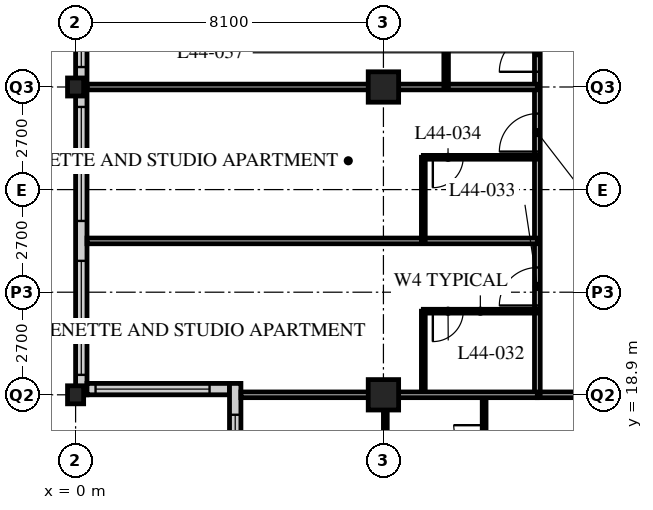
"""IFC4 building model, lengths in metres.
Left out: names, types, materials, properties, quantities, classifications, styles, units other than length and angle.
Written with IfcOpenShell. Run it as: python <this file> out.ifc"""

import sys

from ifc_helpers import new_model, si_unit, direction, frame, frame_2d, origin, origin_2d, place, context, subcontext, project, spatial, rectangle, hollow_rectangle, i_section, extrude, element, fill, save


model = new_model("IFC4")
c1 = context("Model", 3, precision=1e-05, world=origin(), true_north=direction((0.0, 1.0)))
c2 = subcontext(c1, "Body", "Model", "MODEL_VIEW")
j1 = project(units=[si_unit("LENGTHUNIT", "METRE"), si_unit("PLANEANGLEUNIT", "RADIAN")], contexts=[c1])
p1 = place(None, origin())
s1 = spatial("IfcSite", under=j1, at=p1, CompositionType="ELEMENT")
p2 = place(p1, origin())
s2 = spatial("IfcBuilding", under=s1, at=p2, CompositionType="ELEMENT")
p3 = place(p2, frame((0.0, 0.0, 174.0)))
s3 = spatial("IfcBuildingStorey", under=s2, at=p3, CompositionType="ELEMENT", Elevation=174.0)
for number, where, z_axis, x_axis in (
    (1, (0.0, 18.9, 0.0), (0.0, 0.0, 1.0), (1.0, 0.0, 0.0)),
    (2, (0.0, 27.0, 0.0), (0.0, 0.0, 1.0), (1.0, 0.0, 0.0)),
):
    element("IfcColumn", number, at=place(p3, frame(where, z_axis=z_axis, x_axis=x_axis)), inside=s3, PredefinedType="COLUMN", context=c2, shape_type="SweptSolid", body=[
        extrude(i_section(OverallWidth=0.424, OverallDepth=0.475, WebThickness=0.048, FlangeThickness=0.077, FilletRadius=0.015, at=origin_2d()), origin(), (0.0, 0.0, 1.0), 3.6),
    ])
for number, where, z_axis, x_axis in (
    (3, (8.1, 18.9, 0.0), (0.0, 0.0, 1.0), (1.0, 0.0, 0.0)),
    (4, (8.1, 27.0, 0.0), (0.0, 0.0, 1.0), (1.0, 0.0, 0.0)),
):
    element("IfcColumn", number, at=place(p3, frame(where, z_axis=z_axis, x_axis=x_axis)), inside=s3, PredefinedType="COLUMN", context=c2, shape_type="SweptSolid", body=[
        extrude(hollow_rectangle(XDim=0.8, YDim=0.8, WallThickness=0.08, at=origin_2d()), origin(), (0.0, 0.0, 1.0), 3.6),
    ])
p4 = place(p3, frame((0.15, 51.0, 0.0), z_axis=(0.0, 0.0, 1.0), x_axis=(0.0, -1.0, 0.0)))
e5 = element("IfcWall", 5, at=p4, inside=s3, PredefinedType="SOLIDWALL", context=c2, shape_type="SweptSolid", body=[
    extrude(rectangle(XDim=32.1, YDim=0.3, at=frame_2d((16.05, 0.0))), origin(), (0.0, 0.0, 1.0), 3.39),
])
p5 = place(p4, frame((0.225, 0.0, 0.6)))
e6 = element("IfcOpeningElement", 6, at=p5, cuts=e5, PredefinedType="OPENING", context=c2, shape_type="SweptSolid", body=[
    extrude(rectangle(XDim=3.0, YDim=2.4, at=frame_2d((1.5, 1.2))), frame((0.0, 0.16, 0.0), z_axis=(0.0, -1.0, 0.0), x_axis=(1.0, 0.0, 0.0)), (0.0, 0.0, 1.0), 0.32),
])
p6 = place(p4, frame((4.275, 0.0, 0.6)))
e7 = element("IfcOpeningElement", 7, at=p6, cuts=e5, PredefinedType="OPENING", context=c2, shape_type="SweptSolid", body=[
    extrude(rectangle(XDim=3.0, YDim=2.4, at=frame_2d((1.5, 1.2))), frame((0.0, 0.16, 0.0), z_axis=(0.0, -1.0, 0.0), x_axis=(1.0, 0.0, 0.0)), (0.0, 0.0, 1.0), 0.32),
])
p7 = place(p4, frame((8.325, 0.0, 0.6)))
e8 = element("IfcOpeningElement", 8, at=p7, cuts=e5, PredefinedType="OPENING", context=c2, shape_type="SweptSolid", body=[
    extrude(rectangle(XDim=3.0, YDim=2.4, at=frame_2d((1.5, 1.2))), frame((0.0, 0.16, 0.0), z_axis=(0.0, -1.0, 0.0), x_axis=(1.0, 0.0, 0.0)), (0.0, 0.0, 1.0), 0.32),
])
p8 = place(p4, frame((12.375, 0.0, 0.6)))
e9 = element("IfcOpeningElement", 9, at=p8, cuts=e5, PredefinedType="OPENING", context=c2, shape_type="SweptSolid", body=[
    extrude(rectangle(XDim=3.0, YDim=2.4, at=frame_2d((1.5, 1.2))), frame((0.0, 0.16, 0.0), z_axis=(0.0, -1.0, 0.0), x_axis=(1.0, 0.0, 0.0)), (0.0, 0.0, 1.0), 0.32),
])
p9 = place(p4, frame((16.425, 0.0, 0.6)))
e10 = element("IfcOpeningElement", 10, at=p9, cuts=e5, PredefinedType="OPENING", context=c2, shape_type="SweptSolid", body=[
    extrude(rectangle(XDim=3.0, YDim=2.4, at=frame_2d((1.5, 1.2))), frame((0.0, 0.16, 0.0), z_axis=(0.0, -1.0, 0.0), x_axis=(1.0, 0.0, 0.0)), (0.0, 0.0, 1.0), 0.32),
])
p10 = place(p4, frame((20.475, 0.0, 0.6)))
e11 = element("IfcOpeningElement", 11, at=p10, cuts=e5, PredefinedType="OPENING", context=c2, shape_type="SweptSolid", body=[
    extrude(rectangle(XDim=3.0, YDim=2.4, at=frame_2d((1.5, 1.2))), frame((0.0, 0.16, 0.0), z_axis=(0.0, -1.0, 0.0), x_axis=(1.0, 0.0, 0.0)), (0.0, 0.0, 1.0), 0.32),
])
p11 = place(p4, frame((24.525, 0.0, 0.6)))
e12 = element("IfcOpeningElement", 12, at=p11, cuts=e5, PredefinedType="OPENING", context=c2, shape_type="SweptSolid", body=[
    extrude(rectangle(XDim=3.0, YDim=2.4, at=frame_2d((1.5, 1.2))), frame((0.0, 0.16, 0.0), z_axis=(0.0, -1.0, 0.0), x_axis=(1.0, 0.0, 0.0)), (0.0, 0.0, 1.0), 0.32),
])
p12 = place(p4, frame((28.575, 0.0, 0.6)))
e13 = element("IfcOpeningElement", 13, at=p12, cuts=e5, PredefinedType="OPENING", context=c2, shape_type="SweptSolid", body=[
    extrude(rectangle(XDim=3.0, YDim=2.4, at=frame_2d((1.5, 1.2))), frame((0.0, 0.16, 0.0), z_axis=(0.0, -1.0, 0.0), x_axis=(1.0, 0.0, 0.0)), (0.0, 0.0, 1.0), 0.32),
])
p13 = place(p3, frame((0.3, 19.05, 0.0), z_axis=(0.0, 0.0, 1.0), x_axis=(1.0, 0.0, 0.0)))
e14 = element("IfcWall", 14, at=p13, inside=s3, PredefinedType="SOLIDWALL", context=c2, shape_type="SweptSolid", body=[
    extrude(rectangle(XDim=3.75, YDim=0.3, at=frame_2d((1.875, 0.0))), origin(), (0.0, 0.0, 1.0), 3.39),
])
p14 = place(p13, frame((0.225, 0.0, 0.6)))
e15 = element("IfcOpeningElement", 15, at=p14, cuts=e14, PredefinedType="OPENING", context=c2, shape_type="SweptSolid", body=[
    extrude(rectangle(XDim=3.0, YDim=2.0, at=frame_2d((1.5, 1.0))), frame((0.0, 0.16, 0.0), z_axis=(0.0, -1.0, 0.0), x_axis=(1.0, 0.0, 0.0)), (0.0, 0.0, 1.0), 0.32),
])
p15 = place(p3, frame((4.2, 19.2, 0.0), z_axis=(0.0, 0.0, 1.0), x_axis=(0.0, -1.0, 0.0)))
e16 = element("IfcWall", 16, at=p15, inside=s3, PredefinedType="SOLIDWALL", context=c2, shape_type="SweptSolid", body=[
    extrude(rectangle(XDim=4.35, YDim=0.3, at=frame_2d((2.175, 0.0))), origin(), (0.0, 0.0, 1.0), 3.39),
])
p16 = place(p15, frame((0.825, 0.0, 0.6)))
e17 = element("IfcOpeningElement", 17, at=p16, cuts=e16, PredefinedType="OPENING", context=c2, shape_type="SweptSolid", body=[
    extrude(rectangle(XDim=3.0, YDim=2.0, at=frame_2d((1.5, 1.0))), frame((0.0, 0.16, 0.0), z_axis=(0.0, -1.0, 0.0), x_axis=(1.0, 0.0, 0.0)), (0.0, 0.0, 1.0), 0.32),
])
p17 = place(p3, frame((12.15, 18.9, 0.0), z_axis=(0.0, 0.0, 1.0), x_axis=(1.0, 0.0, 0.0)))
e18 = element("IfcWall", 18, at=p17, inside=s3, PredefinedType="PARTITIONING", context=c2, shape_type="SweptSolid", body=[
    extrude(rectangle(XDim=32.4, YDim=0.15, at=frame_2d((16.2, 0.0))), origin(), (0.0, 0.0, 1.0), 2.778),
])
p18 = place(p17, frame((6.4, 0.0, 0.0)))
e19 = element("IfcOpeningElement", 19, at=p18, cuts=e18, PredefinedType="OPENING", context=c2, shape_type="SweptSolid", body=[
    extrude(rectangle(XDim=1.0, YDim=2.1, at=frame_2d((0.5, 1.05))), frame((0.0, 0.085, 0.0), z_axis=(0.0, -1.0, 0.0), x_axis=(1.0, 0.0, 0.0)), (0.0, 0.0, 1.0), 0.17),
])
p19 = place(p17, frame((8.8, 0.0, 0.0)))
e20 = element("IfcOpeningElement", 20, at=p19, cuts=e18, PredefinedType="OPENING", context=c2, shape_type="SweptSolid", body=[
    extrude(rectangle(XDim=1.0, YDim=2.1, at=frame_2d((0.5, 1.05))), frame((0.0, 0.085, 0.0), z_axis=(0.0, -1.0, 0.0), x_axis=(1.0, 0.0, 0.0)), (0.0, 0.0, 1.0), 0.17),
])
p20 = place(p17, frame((13.05, 0.0, 0.0)))
e21 = element("IfcOpeningElement", 21, at=p20, cuts=e18, PredefinedType="OPENING", context=c2, shape_type="SweptSolid", body=[
    extrude(rectangle(XDim=1.0, YDim=2.1, at=frame_2d((0.5, 1.05))), frame((0.0, 0.085, 0.0), z_axis=(0.0, -1.0, 0.0), x_axis=(1.0, 0.0, 0.0)), (0.0, 0.0, 1.0), 0.17),
])
p21 = place(p17, frame((22.6, 0.0, 0.0)))
e22 = element("IfcOpeningElement", 22, at=p21, cuts=e18, PredefinedType="OPENING", context=c2, shape_type="SweptSolid", body=[
    extrude(rectangle(XDim=1.0, YDim=2.1, at=frame_2d((0.5, 1.05))), frame((0.0, 0.085, 0.0), z_axis=(0.0, -1.0, 0.0), x_axis=(1.0, 0.0, 0.0)), (0.0, 0.0, 1.0), 0.17),
])
p22 = place(p17, frame((25.0, 0.0, 0.0)))
e23 = element("IfcOpeningElement", 23, at=p22, cuts=e18, PredefinedType="OPENING", context=c2, shape_type="SweptSolid", body=[
    extrude(rectangle(XDim=1.0, YDim=2.1, at=frame_2d((0.5, 1.05))), frame((0.0, 0.085, 0.0), z_axis=(0.0, -1.0, 0.0), x_axis=(1.0, 0.0, 0.0)), (0.0, 0.0, 1.0), 0.17),
])
p23 = place(p17, frame((1.525, 0.0, 0.0)))
e24 = element("IfcOpeningElement", 24, at=p23, cuts=e18, PredefinedType="OPENING", context=c2, shape_type="SweptSolid", body=[
    extrude(rectangle(XDim=1.0, YDim=2.1, at=frame_2d((0.5, 1.05))), frame((0.0, 0.085, 0.0), z_axis=(0.0, -1.0, 0.0), x_axis=(1.0, 0.0, 0.0)), (0.0, 0.0, 1.0), 0.17),
])
p24 = place(p17, frame((29.875, 0.0, 0.0)))
e25 = element("IfcOpeningElement", 25, at=p24, cuts=e18, PredefinedType="OPENING", context=c2, shape_type="SweptSolid", body=[
    extrude(rectangle(XDim=1.0, YDim=2.1, at=frame_2d((0.5, 1.05))), frame((0.0, 0.085, 0.0), z_axis=(0.0, -1.0, 0.0), x_axis=(1.0, 0.0, 0.0)), (0.0, 0.0, 1.0), 0.17),
])
p25 = place(p3, frame((12.15, 18.9, 0.0), z_axis=(0.0, 0.0, 1.0), x_axis=(0.0, 1.0, 0.0)))
e26 = element("IfcWall", 26, at=p25, inside=s3, PredefinedType="PARTITIONING", context=c2, shape_type="SweptSolid", body=[
    extrude(rectangle(XDim=24.3, YDim=0.15, at=frame_2d((12.15, 0.0))), origin(), (0.0, 0.0, 1.0), 3.39),
])
p26 = place(p25, frame((2.35, 0.0, 0.0)))
e27 = element("IfcOpeningElement", 27, at=p26, cuts=e26, PredefinedType="OPENING", context=c2, shape_type="SweptSolid", body=[
    extrude(rectangle(XDim=1.0, YDim=2.1, at=frame_2d((0.5, 1.05))), frame((0.0, 0.085, 0.0), z_axis=(0.0, -1.0, 0.0), x_axis=(1.0, 0.0, 0.0)), (0.0, 0.0, 1.0), 0.17),
])
p27 = place(p25, frame((6.4, 0.0, 0.0)))
e28 = element("IfcOpeningElement", 28, at=p27, cuts=e26, PredefinedType="OPENING", context=c2, shape_type="SweptSolid", body=[
    extrude(rectangle(XDim=1.0, YDim=2.1, at=frame_2d((0.5, 1.05))), frame((0.0, 0.085, 0.0), z_axis=(0.0, -1.0, 0.0), x_axis=(1.0, 0.0, 0.0)), (0.0, 0.0, 1.0), 0.17),
])
p28 = place(p25, frame((8.5, 0.0, 0.0)))
e29 = element("IfcOpeningElement", 29, at=p28, cuts=e26, PredefinedType="OPENING", context=c2, shape_type="SweptSolid", body=[
    extrude(rectangle(XDim=1.0, YDim=2.1, at=frame_2d((0.5, 1.05))), frame((0.0, 0.085, 0.0), z_axis=(0.0, -1.0, 0.0), x_axis=(1.0, 0.0, 0.0)), (0.0, 0.0, 1.0), 0.17),
])
p29 = place(p25, frame((16.6, 0.0, 0.0)))
e30 = element("IfcOpeningElement", 30, at=p29, cuts=e26, PredefinedType="OPENING", context=c2, shape_type="SweptSolid", body=[
    extrude(rectangle(XDim=1.0, YDim=2.1, at=frame_2d((0.5, 1.05))), frame((0.0, 0.085, 0.0), z_axis=(0.0, -1.0, 0.0), x_axis=(1.0, 0.0, 0.0)), (0.0, 0.0, 1.0), 0.17),
])
p30 = place(p3, frame((9.15, 18.9, 0.0), z_axis=(0.0, 0.0, 1.0), x_axis=(0.0, 1.0, 0.0)))
e31 = element("IfcWall", 31, at=p30, inside=s3, PredefinedType="PARTITIONING", context=c2, shape_type="SweptSolid", body=[
    extrude(rectangle(XDim=2.2, YDim=0.1, at=frame_2d((1.1, 0.0))), origin(), (0.0, 0.0, 1.0), 3.39),
])
p31 = place(p3, frame((12.15, 21.1, 0.0), z_axis=(0.0, 0.0, 1.0), x_axis=(-1.0, 0.0, 0.0)))
e32 = element("IfcWall", 32, at=p31, inside=s3, PredefinedType="PARTITIONING", context=c2, shape_type="SweptSolid", body=[
    extrude(rectangle(XDim=3.0, YDim=0.1, at=frame_2d((1.5, 0.0))), origin(), (0.0, 0.0, 1.0), 3.39),
])
p32 = place(p31, frame((1.95, 0.0, 0.0)))
e33 = element("IfcOpeningElement", 33, at=p32, cuts=e32, PredefinedType="OPENING", context=c2, shape_type="SweptSolid", body=[
    extrude(rectangle(XDim=0.8, YDim=2.1, at=frame_2d((0.4, 1.05))), frame((0.0, 0.06, 0.0), z_axis=(0.0, -1.0, 0.0), x_axis=(1.0, 0.0, 0.0)), (0.0, 0.0, 1.0), 0.12),
])
p33 = place(p3, frame((12.15, 22.95, 0.0), z_axis=(0.0, 0.0, 1.0), x_axis=(-1.0, 0.0, 0.0)))
e34 = element("IfcWall", 34, at=p33, inside=s3, PredefinedType="PARTITIONING", context=c2, shape_type="SweptSolid", body=[
    extrude(rectangle(XDim=11.85, YDim=0.15, at=frame_2d((5.925, 0.0))), origin(), (0.0, 0.0, 1.0), 3.39),
])
p34 = place(p3, frame((9.15, 22.95, 0.0), z_axis=(0.0, 0.0, 1.0), x_axis=(0.0, 1.0, 0.0)))
e35 = element("IfcWall", 35, at=p34, inside=s3, PredefinedType="PARTITIONING", context=c2, shape_type="SweptSolid", body=[
    extrude(rectangle(XDim=2.2, YDim=0.1, at=frame_2d((1.1, 0.0))), origin(), (0.0, 0.0, 1.0), 3.39),
])
p35 = place(p3, frame((12.15, 25.15, 0.0), z_axis=(0.0, 0.0, 1.0), x_axis=(-1.0, 0.0, 0.0)))
e36 = element("IfcWall", 36, at=p35, inside=s3, PredefinedType="PARTITIONING", context=c2, shape_type="SweptSolid", body=[
    extrude(rectangle(XDim=3.0, YDim=0.1, at=frame_2d((1.5, 0.0))), origin(), (0.0, 0.0, 1.0), 3.39),
])
p36 = place(p35, frame((1.95, 0.0, 0.0)))
e37 = element("IfcOpeningElement", 37, at=p36, cuts=e36, PredefinedType="OPENING", context=c2, shape_type="SweptSolid", body=[
    extrude(rectangle(XDim=0.8, YDim=2.1, at=frame_2d((0.4, 1.05))), frame((0.0, 0.06, 0.0), z_axis=(0.0, -1.0, 0.0), x_axis=(1.0, 0.0, 0.0)), (0.0, 0.0, 1.0), 0.12),
])
p37 = place(p3, frame((12.15, 27.0, 0.0), z_axis=(0.0, 0.0, 1.0), x_axis=(-1.0, 0.0, 0.0)))
e38 = element("IfcWall", 38, at=p37, inside=s3, PredefinedType="PARTITIONING", context=c2, shape_type="SweptSolid", body=[
    extrude(rectangle(XDim=11.85, YDim=0.15, at=frame_2d((5.925, 0.0))), origin(), (0.0, 0.0, 1.0), 2.778),
])
p38 = place(p3, frame((9.75, 27.0, 0.0), z_axis=(0.0, 0.0, 1.0), x_axis=(0.0, 1.0, 0.0)))
e39 = element("IfcWall", 39, at=p38, inside=s3, PredefinedType="PARTITIONING", context=c2, shape_type="SweptSolid", body=[
    extrude(rectangle(XDim=16.2, YDim=0.12, at=frame_2d((8.1, 0.0))), origin(), (0.0, 0.0, 1.0), 3.39),
])
p39 = place(p38, frame((0.975, 0.0, 0.0)))
e40 = element("IfcOpeningElement", 40, at=p39, cuts=e39, PredefinedType="OPENING", context=c2, shape_type="SweptSolid", body=[
    extrude(rectangle(XDim=0.85, YDim=2.1, at=frame_2d((0.425, 1.05))), frame((0.0, 0.07, 0.0), z_axis=(0.0, -1.0, 0.0), x_axis=(1.0, 0.0, 0.0)), (0.0, 0.0, 1.0), 0.14),
])
p40 = place(p38, frame((4.375, 0.0, 0.0)))
e41 = element("IfcOpeningElement", 41, at=p40, cuts=e39, PredefinedType="OPENING", context=c2, shape_type="SweptSolid", body=[
    extrude(rectangle(XDim=0.85, YDim=2.1, at=frame_2d((0.425, 1.05))), frame((0.0, 0.07, 0.0), z_axis=(0.0, -1.0, 0.0), x_axis=(1.0, 0.0, 0.0)), (0.0, 0.0, 1.0), 0.14),
])
p41 = place(p38, frame((9.075, 0.0, 0.0)))
e42 = element("IfcOpeningElement", 42, at=p41, cuts=e39, PredefinedType="OPENING", context=c2, shape_type="SweptSolid", body=[
    extrude(rectangle(XDim=0.85, YDim=2.1, at=frame_2d((0.425, 1.05))), frame((0.0, 0.07, 0.0), z_axis=(0.0, -1.0, 0.0), x_axis=(1.0, 0.0, 0.0)), (0.0, 0.0, 1.0), 0.14),
])
p42 = place(p38, frame((12.475, 0.0, 0.0)))
e43 = element("IfcOpeningElement", 43, at=p42, cuts=e39, PredefinedType="OPENING", context=c2, shape_type="SweptSolid", body=[
    extrude(rectangle(XDim=0.85, YDim=2.1, at=frame_2d((0.425, 1.05))), frame((0.0, 0.07, 0.0), z_axis=(0.0, -1.0, 0.0), x_axis=(1.0, 0.0, 0.0)), (0.0, 0.0, 1.0), 0.14),
])
p43 = place(p3, frame((10.75, 18.9, 0.0), z_axis=(0.0, 0.0, 1.0), x_axis=(0.0, -1.0, 0.0)))
e44 = element("IfcWall", 44, at=p43, inside=s3, PredefinedType="PARTITIONING", context=c2, shape_type="SweptSolid", body=[
    extrude(rectangle(XDim=2.4, YDim=0.1, at=frame_2d((1.2, 0.0))), origin(), (0.0, 0.0, 1.0), 3.39),
])
p44 = place(p43, frame((0.8, 0.0, 0.0)))
e45 = element("IfcOpeningElement", 45, at=p44, cuts=e44, PredefinedType="OPENING", context=c2, shape_type="SweptSolid", body=[
    extrude(rectangle(XDim=0.8, YDim=2.1, at=frame_2d((0.4, 1.05))), frame((0.0, 0.06, 0.0), z_axis=(0.0, -1.0, 0.0), x_axis=(1.0, 0.0, 0.0)), (0.0, 0.0, 1.0), 0.12),
])
p45 = place(p3, frame((8.15, 18.9, 0.0), z_axis=(0.0, 0.0, 1.0), x_axis=(0.0, -1.0, 0.0)))
e46 = element("IfcWall", 46, at=p45, inside=s3, PredefinedType="PARTITIONING", context=c2, shape_type="SweptSolid", body=[
    extrude(rectangle(XDim=2.4, YDim=0.1, at=frame_2d((1.2, 0.0))), origin(), (0.0, 0.0, 1.0), 2.778),
])
p46 = place(p3, frame((4.35, 18.9, 0.0), z_axis=(0.0, 0.0, 1.0), x_axis=(1.0, 0.0, 0.0)))
e47 = element("IfcWall", 47, at=p46, inside=s3, PredefinedType="PARTITIONING", context=c2, shape_type="SweptSolid", body=[
    extrude(rectangle(XDim=7.8, YDim=0.15, at=frame_2d((3.9, 0.0))), origin(), (0.0, 0.0, 1.0), 2.778),
])
p47 = place(p10, origin())
e48 = element("IfcWindow", 48, at=p47, inside=s3, PartitioningType="SINGLE_PANEL", PredefinedType="WINDOW", context=c2, shape_type="SweptSolid", body=[
    extrude(rectangle(XDim=3.0, YDim=2.4, at=frame_2d((1.5, 1.2))), frame((0.0, 0.03, 0.0), z_axis=(0.0, -1.0, 0.0), x_axis=(1.0, 0.0, 0.0)), (0.0, 0.0, 1.0), 0.06),
])
fill(e11, e48)
p48 = place(p11, origin())
e49 = element("IfcWindow", 49, at=p48, inside=s3, PartitioningType="SINGLE_PANEL", PredefinedType="WINDOW", context=c2, shape_type="SweptSolid", body=[
    extrude(rectangle(XDim=3.0, YDim=2.4, at=frame_2d((1.5, 1.2))), frame((0.0, 0.03, 0.0), z_axis=(0.0, -1.0, 0.0), x_axis=(1.0, 0.0, 0.0)), (0.0, 0.0, 1.0), 0.06),
])
fill(e12, e49)
p49 = place(p12, origin())
e50 = element("IfcWindow", 50, at=p49, inside=s3, PartitioningType="SINGLE_PANEL", PredefinedType="WINDOW", context=c2, shape_type="SweptSolid", body=[
    extrude(rectangle(XDim=3.0, YDim=2.4, at=frame_2d((1.5, 1.2))), frame((0.0, 0.03, 0.0), z_axis=(0.0, -1.0, 0.0), x_axis=(1.0, 0.0, 0.0)), (0.0, 0.0, 1.0), 0.06),
])
fill(e13, e50)
p50 = place(p14, origin())
e51 = element("IfcWindow", 51, at=p50, inside=s3, PartitioningType="SINGLE_PANEL", PredefinedType="WINDOW", context=c2, shape_type="SweptSolid", body=[
    extrude(rectangle(XDim=3.0, YDim=2.0, at=frame_2d((1.5, 1.0))), frame((0.0, 0.03, 0.0), z_axis=(0.0, -1.0, 0.0), x_axis=(1.0, 0.0, 0.0)), (0.0, 0.0, 1.0), 0.06),
])
fill(e15, e51)
p51 = place(p16, origin())
e52 = element("IfcWindow", 52, at=p51, inside=s3, PartitioningType="SINGLE_PANEL", PredefinedType="WINDOW", context=c2, shape_type="SweptSolid", body=[
    extrude(rectangle(XDim=3.0, YDim=2.0, at=frame_2d((1.5, 1.0))), frame((0.0, 0.03, 0.0), z_axis=(0.0, -1.0, 0.0), x_axis=(1.0, 0.0, 0.0)), (0.0, 0.0, 1.0), 0.06),
])
fill(e17, e52)
p52 = place(p32, origin())
e53 = element("IfcDoor", 53, at=p52, inside=s3, OperationType="SINGLE_SWING_RIGHT", PredefinedType="DOOR", context=c2, shape_type="SweptSolid", body=[
    extrude(rectangle(XDim=0.8, YDim=2.1, at=frame_2d((0.4, 1.05))), frame((0.0, 0.025, 0.0), z_axis=(0.0, -1.0, 0.0), x_axis=(1.0, 0.0, 0.0)), (0.0, 0.0, 1.0), 0.05),
])
fill(e33, e53)
p53 = place(p26, origin())
e54 = element("IfcDoor", 54, at=p53, inside=s3, OperationType="SINGLE_SWING_LEFT", PredefinedType="DOOR", context=c2, shape_type="SweptSolid", body=[
    extrude(rectangle(XDim=1.0, YDim=2.1, at=frame_2d((0.5, 1.05))), frame((0.0, 0.025, 0.0), z_axis=(0.0, -1.0, 0.0), x_axis=(1.0, 0.0, 0.0)), (0.0, 0.0, 1.0), 0.05),
])
fill(e27, e54)
p54 = place(p36, origin())
e55 = element("IfcDoor", 55, at=p54, inside=s3, OperationType="SINGLE_SWING_RIGHT", PredefinedType="DOOR", context=c2, shape_type="SweptSolid", body=[
    extrude(rectangle(XDim=0.8, YDim=2.1, at=frame_2d((0.4, 1.05))), frame((0.0, 0.025, 0.0), z_axis=(0.0, -1.0, 0.0), x_axis=(1.0, 0.0, 0.0)), (0.0, 0.0, 1.0), 0.05),
])
fill(e37, e55)
p55 = place(p27, origin())
e56 = element("IfcDoor", 56, at=p55, inside=s3, OperationType="SINGLE_SWING_LEFT", PredefinedType="DOOR", context=c2, shape_type="SweptSolid", body=[
    extrude(rectangle(XDim=1.0, YDim=2.1, at=frame_2d((0.5, 1.05))), frame((0.0, 0.025, 0.0), z_axis=(0.0, -1.0, 0.0), x_axis=(1.0, 0.0, 0.0)), (0.0, 0.0, 1.0), 0.05),
])
fill(e28, e56)
p56 = place(p28, origin())
e57 = element("IfcDoor", 57, at=p56, inside=s3, OperationType="SINGLE_SWING_LEFT", PredefinedType="DOOR", context=c2, shape_type="SweptSolid", body=[
    extrude(rectangle(XDim=1.0, YDim=2.1, at=frame_2d((0.5, 1.05))), frame((0.0, 0.025, 0.0), z_axis=(0.0, -1.0, 0.0), x_axis=(1.0, 0.0, 0.0)), (0.0, 0.0, 1.0), 0.05),
])
fill(e29, e57)
p57 = place(p44, origin())
e58 = element("IfcDoor", 58, at=p57, inside=s3, OperationType="SINGLE_SWING_RIGHT", PredefinedType="DOOR", context=c2, shape_type="SweptSolid", body=[
    extrude(rectangle(XDim=0.8, YDim=2.1, at=frame_2d((0.4, 1.05))), frame((0.0, 0.025, 0.0), z_axis=(0.0, -1.0, 0.0), x_axis=(1.0, 0.0, 0.0)), (0.0, 0.0, 1.0), 0.05),
])
fill(e45, e58)
save(model, sys.argv[1])
